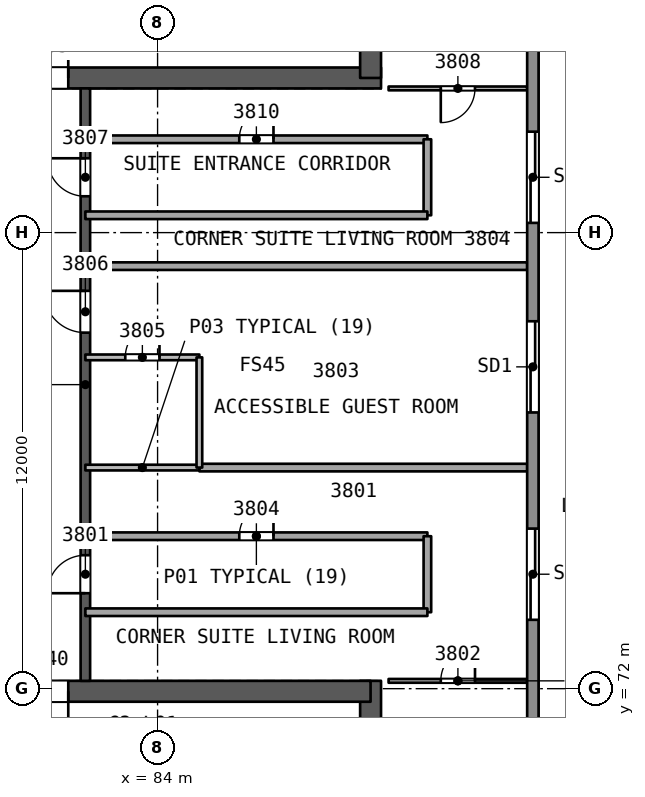
"""IFC4 building model, lengths in metres.
Left out: names, types, materials, properties, quantities, classifications, styles, units other than length and angle.
Written with IfcOpenShell. Run it as: python <this file> out.ifc"""

import sys

from ifc_helpers import new_model, si_unit, direction, frame, frame_2d, origin, place, context, subcontext, project, spatial, rectangle, extrude, element, fill, save


model = new_model("IFC4")
c1 = context("Model", 3, precision=1e-05, world=origin(), true_north=direction((0.0, 1.0)))
c2 = subcontext(c1, "Body", "Model", "MODEL_VIEW")
j1 = project(units=[si_unit("LENGTHUNIT", "METRE"), si_unit("PLANEANGLEUNIT", "RADIAN")], contexts=[c1])
p1 = place(None, origin())
s1 = spatial("IfcSite", under=j1, at=p1, CompositionType="ELEMENT")
p2 = place(p1, origin())
s2 = spatial("IfcBuilding", under=s1, at=p2, CompositionType="ELEMENT")
p3 = place(p2, frame((0.0, 0.0, 160.0)))
s3 = spatial("IfcBuildingStorey", under=s2, at=p3, CompositionType="ELEMENT", Elevation=160.0)
p4 = place(p3, frame((79.659, 88.069, 0.0), z_axis=(0.0, 0.0, 1.0), x_axis=(1.0, 0.0, 0.0)))
e1 = element("IfcWall", 1, at=p4, inside=s3, PredefinedType="SHEAR", context=c2, shape_type="SweptSolid", body=[
    extrude(rectangle(XDim=10.221, YDim=0.55, at=frame_2d((5.111, 0.0))), origin(), (0.0, 0.0, 1.0), 3.7),
])
p5 = place(p4, frame((0.791, 0.0, 0.0)))
e2 = element("IfcOpeningElement", 2, at=p5, cuts=e1, PredefinedType="OPENING", context=c2, shape_type="SweptSolid", body=[
    extrude(rectangle(XDim=1.2, YDim=2.1, at=frame_2d((0.6, 1.05))), frame((0.0, 0.286, 0.0), z_axis=(0.0, -1.0, 0.0), x_axis=(1.0, 0.0, 0.0)), (0.0, 0.0, 1.0), 0.571),
])
p6 = place(p3, frame((89.605, 88.069, 0.0), z_axis=(0.0, 0.0, 1.0), x_axis=(0.0, 1.0, 0.0)))
e3 = element("IfcWall", 3, at=p6, inside=s3, PredefinedType="SHEAR", context=c2, shape_type="SweptSolid", body=[
    extrude(rectangle(XDim=14.058, YDim=0.55, at=frame_2d((7.029, 0.0))), origin(), (0.0, 0.0, 1.0), 3.7),
])
p7 = place(p3, frame((89.605, 58.031, 0.0), z_axis=(0.0, 0.0, 1.0), x_axis=(0.0, 1.0, 0.0)))
e4 = element("IfcWall", 4, at=p7, inside=s3, PredefinedType="SHEAR", context=c2, shape_type="SweptSolid", body=[
    extrude(rectangle(XDim=14.175, YDim=0.55, at=frame_2d((7.087, 0.0))), origin(), (0.0, 0.0, 1.0), 3.7),
])
p8 = place(p3, frame((89.605, 71.931, 0.0), z_axis=(0.0, 0.0, 1.0), x_axis=(-1.0, 0.0, 0.0)))
e5 = element("IfcWall", 5, at=p8, inside=s3, PredefinedType="SHEAR", context=c2, shape_type="SweptSolid", body=[
    extrude(rectangle(XDim=10.105, YDim=0.55, at=frame_2d((5.052, 0.0))), origin(), (0.0, 0.0, 1.0), 3.7),
])
p9 = place(p8, frame((7.955, 0.0, 0.0)))
e6 = element("IfcOpeningElement", 6, at=p9, cuts=e5, PredefinedType="OPENING", context=c2, shape_type="SweptSolid", body=[
    extrude(rectangle(XDim=1.2, YDim=2.1, at=frame_2d((0.6, 1.05))), frame((0.0, 0.286, 0.0), z_axis=(0.0, -1.0, 0.0), x_axis=(1.0, 0.0, 0.0)), (0.0, 0.0, 1.0), 0.571),
])
p10 = place(p3, frame((82.1, 72.206, 0.0), z_axis=(0.0, 0.0, 1.0), x_axis=(0.0, 1.0, 0.0)))
e7 = element("IfcWall", 7, at=p10, inside=s3, PredefinedType="SHEAR", context=c2, shape_type="SweptSolid", body=[
    extrude(rectangle(XDim=15.588, YDim=0.25, at=frame_2d((7.794, 0.0))), origin(), (0.0, 0.0, 1.0), 3.25),
])
p11 = place(p10, frame((2.306, 0.0, 0.0)))
e8 = element("IfcOpeningElement", 8, at=p11, cuts=e7, PredefinedType="OPENING", context=c2, shape_type="SweptSolid", body=[
    extrude(rectangle(XDim=1.0, YDim=2.1, at=frame_2d((0.5, 1.05))), frame((0.0, 0.135, 0.0), z_axis=(0.0, -1.0, 0.0), x_axis=(1.0, 0.0, 0.0)), (0.0, 0.0, 1.0), 0.271),
])
p12 = place(p10, frame((9.162, 0.0, 0.0)))
e9 = element("IfcOpeningElement", 9, at=p12, cuts=e7, PredefinedType="OPENING", context=c2, shape_type="SweptSolid", body=[
    extrude(rectangle(XDim=1.1, YDim=2.1, at=frame_2d((0.55, 1.05))), frame((0.0, 0.135, 0.0), z_axis=(0.0, -1.0, 0.0), x_axis=(1.0, 0.0, 0.0)), (0.0, 0.0, 1.0), 0.271),
])
p13 = place(p10, frame((12.75, 0.0, 0.0)))
e10 = element("IfcOpeningElement", 10, at=p13, cuts=e7, PredefinedType="OPENING", context=c2, shape_type="SweptSolid", body=[
    extrude(rectangle(XDim=1.0, YDim=2.1, at=frame_2d((0.5, 1.05))), frame((0.0, 0.135, 0.0), z_axis=(0.0, -1.0, 0.0), x_axis=(1.0, 0.0, 0.0)), (0.0, 0.0, 1.0), 0.271),
])
p14 = place(p3, frame((90.079, 72.206, 0.0), z_axis=(0.0, 0.0, 1.0), x_axis=(1.0, 0.0, 0.0)))
e11 = element("IfcWall", 11, at=p14, inside=s3, PredefinedType="PARTITIONING", context=c2, shape_type="SweptSolid", body=[
    extrude(rectangle(XDim=3.647, YDim=0.1, at=frame_2d((1.824, 0.0))), origin(), (0.0, 0.0, 1.0), 3.25),
])
p15 = place(p14, frame((1.374, 0.0, 0.0)))
e12 = element("IfcOpeningElement", 12, at=p15, cuts=e11, PredefinedType="OPENING", context=c2, shape_type="SweptSolid", body=[
    extrude(rectangle(XDim=0.9, YDim=2.1, at=frame_2d((0.45, 1.05))), frame((0.0, 0.061, 0.0), z_axis=(0.0, -1.0, 0.0), x_axis=(1.0, 0.0, 0.0)), (0.0, 0.0, 1.0), 0.121),
])
p16 = place(p3, frame((82.1, 76.012, 0.0), z_axis=(0.0, 0.0, 1.0), x_axis=(1.0, 0.0, 0.0)))
e13 = element("IfcWall", 13, at=p16, inside=s3, PredefinedType="PARTITIONING", context=c2, shape_type="SweptSolid", body=[
    extrude(rectangle(XDim=9.0, YDim=0.2, at=frame_2d((4.5, 0.0))), origin(), (0.0, 0.0, 1.0), 3.25),
])
p17 = place(p16, frame((4.05, 0.0, 0.0)))
e14 = element("IfcOpeningElement", 14, at=p17, cuts=e13, PredefinedType="OPENING", context=c2, shape_type="SweptSolid", body=[
    extrude(rectangle(XDim=0.9, YDim=2.1, at=frame_2d((0.45, 1.05))), frame((0.0, 0.11, 0.0), z_axis=(0.0, -1.0, 0.0), x_axis=(1.0, 0.0, 0.0)), (0.0, 0.0, 1.0), 0.221),
])
p18 = place(p3, frame((91.1, 76.012, 0.0), z_axis=(0.0, 0.0, 1.0), x_axis=(0.0, -1.0, 0.0)))
e15 = element("IfcWall", 15, at=p18, inside=s3, PredefinedType="PARTITIONING", context=c2, shape_type="SweptSolid", body=[
    extrude(rectangle(XDim=2.0, YDim=0.2, at=frame_2d((1.0, 0.0))), origin(), (0.0, 0.0, 1.0), 3.25),
])
p19 = place(p3, frame((91.1, 74.012, 0.0), z_axis=(0.0, 0.0, 1.0), x_axis=(-1.0, 0.0, 0.0)))
e16 = element("IfcWall", 16, at=p19, inside=s3, PredefinedType="PARTITIONING", context=c2, shape_type="SweptSolid", body=[
    extrude(rectangle(XDim=9.0, YDim=0.2, at=frame_2d((4.5, 0.0))), origin(), (0.0, 0.0, 1.0), 3.25),
])
p20 = place(p3, frame((93.726, 77.818, 0.0), z_axis=(0.0, 0.0, 1.0), x_axis=(-1.0, 0.0, 0.0)))
e17 = element("IfcWall", 17, at=p20, inside=s3, PredefinedType="PARTITIONING", context=c2, shape_type="SweptSolid", body=[
    extrude(rectangle(XDim=8.626, YDim=0.2, at=frame_2d((4.313, 0.0))), origin(), (0.0, 0.0, 1.0), 3.25),
])
p21 = place(p3, frame((85.1, 77.818, 0.0), z_axis=(0.0, 0.0, 1.0), x_axis=(-1.0, 0.0, 0.0)))
e18 = element("IfcWall", 18, at=p21, inside=s3, PredefinedType="PARTITIONING", context=c2, shape_type="SweptSolid", body=[
    extrude(rectangle(XDim=3.0, YDim=0.15, at=frame_2d((1.5, 0.0))), origin(), (0.0, 0.0, 1.0), 3.25),
])
p22 = place(p3, frame((82.1, 80.718, 0.0), z_axis=(0.0, 0.0, 1.0), x_axis=(1.0, 0.0, 0.0)))
e19 = element("IfcWall", 19, at=p22, inside=s3, PredefinedType="PARTITIONING", context=c2, shape_type="SweptSolid", body=[
    extrude(rectangle(XDim=3.0, YDim=0.15, at=frame_2d((1.5, 0.0))), origin(), (0.0, 0.0, 1.0), 3.25),
])
p23 = place(p22, frame((1.05, 0.0, 0.0)))
e20 = element("IfcOpeningElement", 20, at=p23, cuts=e19, PredefinedType="OPENING", context=c2, shape_type="SweptSolid", body=[
    extrude(rectangle(XDim=0.9, YDim=2.1, at=frame_2d((0.45, 1.05))), frame((0.0, 0.085, 0.0), z_axis=(0.0, -1.0, 0.0), x_axis=(1.0, 0.0, 0.0)), (0.0, 0.0, 1.0), 0.171),
])
p24 = place(p3, frame((85.1, 80.718, 0.0), z_axis=(0.0, 0.0, 1.0), x_axis=(0.0, -1.0, 0.0)))
e21 = element("IfcWall", 21, at=p24, inside=s3, PredefinedType="PARTITIONING", context=c2, shape_type="SweptSolid", body=[
    extrude(rectangle(XDim=2.9, YDim=0.15, at=frame_2d((1.45, 0.0))), origin(), (0.0, 0.0, 1.0), 3.25),
])
p25 = place(p3, frame((93.726, 83.118, 0.0), z_axis=(0.0, 0.0, 1.0), x_axis=(-1.0, 0.0, 0.0)))
e22 = element("IfcWall", 22, at=p25, inside=s3, PredefinedType="PARTITIONING", context=c2, shape_type="SweptSolid", body=[
    extrude(rectangle(XDim=11.626, YDim=0.2, at=frame_2d((5.813, 0.0))), origin(), (0.0, 0.0, 1.0), 3.25),
])
p26 = place(p3, frame((93.726, 87.794, 0.0), z_axis=(0.0, 0.0, 1.0), x_axis=(-1.0, 0.0, 0.0)))
e23 = element("IfcWall", 23, at=p26, inside=s3, PredefinedType="PARTITIONING", context=c2, shape_type="SweptSolid", body=[
    extrude(rectangle(XDim=3.647, YDim=0.1, at=frame_2d((1.824, 0.0))), origin(), (0.0, 0.0, 1.0), 3.25),
])
p27 = place(p26, frame((1.374, 0.0, 0.0)))
e24 = element("IfcOpeningElement", 24, at=p27, cuts=e23, PredefinedType="OPENING", context=c2, shape_type="SweptSolid", body=[
    extrude(rectangle(XDim=0.9, YDim=2.1, at=frame_2d((0.45, 1.05))), frame((0.0, 0.061, 0.0), z_axis=(0.0, -1.0, 0.0), x_axis=(1.0, 0.0, 0.0)), (0.0, 0.0, 1.0), 0.121),
])
p28 = place(p3, frame((82.1, 86.456, 0.0), z_axis=(0.0, 0.0, 1.0), x_axis=(1.0, 0.0, 0.0)))
e25 = element("IfcWall", 25, at=p28, inside=s3, PredefinedType="PARTITIONING", context=c2, shape_type="SweptSolid", body=[
    extrude(rectangle(XDim=9.0, YDim=0.2, at=frame_2d((4.5, 0.0))), origin(), (0.0, 0.0, 1.0), 3.25),
])
p29 = place(p28, frame((4.05, 0.0, 0.0)))
e26 = element("IfcOpeningElement", 26, at=p29, cuts=e25, PredefinedType="OPENING", context=c2, shape_type="SweptSolid", body=[
    extrude(rectangle(XDim=0.9, YDim=2.1, at=frame_2d((0.45, 1.05))), frame((0.0, 0.11, 0.0), z_axis=(0.0, -1.0, 0.0), x_axis=(1.0, 0.0, 0.0)), (0.0, 0.0, 1.0), 0.221),
])
p30 = place(p3, frame((91.1, 86.456, 0.0), z_axis=(0.0, 0.0, 1.0), x_axis=(0.0, -1.0, 0.0)))
e27 = element("IfcWall", 27, at=p30, inside=s3, PredefinedType="PARTITIONING", context=c2, shape_type="SweptSolid", body=[
    extrude(rectangle(XDim=2.0, YDim=0.2, at=frame_2d((1.0, 0.0))), origin(), (0.0, 0.0, 1.0), 3.25),
])
p31 = place(p3, frame((91.1, 84.456, 0.0), z_axis=(0.0, 0.0, 1.0), x_axis=(-1.0, 0.0, 0.0)))
e28 = element("IfcWall", 28, at=p31, inside=s3, PredefinedType="PARTITIONING", context=c2, shape_type="SweptSolid", body=[
    extrude(rectangle(XDim=9.0, YDim=0.2, at=frame_2d((4.5, 0.0))), origin(), (0.0, 0.0, 1.0), 3.25),
])
p32 = place(p3, frame((93.875, 107.14, 0.0), z_axis=(0.0, 0.0, 1.0), x_axis=(0.0, -1.0, 0.0)))
e29 = element("IfcWall", 29, at=p32, inside=s3, PredefinedType="SOLIDWALL", context=c2, shape_type="SweptSolid", body=[
    extrude(rectangle(XDim=54.279, YDim=0.3, at=frame_2d((27.14, 0.0))), origin(), (0.0, 0.0, 1.0), 3.25),
])
p33 = place(p32, frame((25.472, 0.0, 0.0)))
e30 = element("IfcOpeningElement", 30, at=p33, cuts=e29, PredefinedType="OPENING", context=c2, shape_type="SweptSolid", body=[
    extrude(rectangle(XDim=2.4, YDim=2.4, at=frame_2d((1.2, 1.2))), frame((0.0, 0.161, 0.0), z_axis=(0.0, -1.0, 0.0), x_axis=(1.0, 0.0, 0.0)), (0.0, 0.0, 1.0), 0.321),
])
p34 = place(p32, frame((30.928, 0.0, 0.0)))
e31 = element("IfcOpeningElement", 31, at=p34, cuts=e29, PredefinedType="OPENING", context=c2, shape_type="SweptSolid", body=[
    extrude(rectangle(XDim=2.4, YDim=2.4, at=frame_2d((1.2, 1.2))), frame((0.0, 0.161, 0.0), z_axis=(0.0, -1.0, 0.0), x_axis=(1.0, 0.0, 0.0)), (0.0, 0.0, 1.0), 0.321),
])
p35 = place(p32, frame((42.175, 0.0, 0.0)))
e32 = element("IfcOpeningElement", 32, at=p35, cuts=e29, PredefinedType="OPENING", context=c2, shape_type="SweptSolid", body=[
    extrude(rectangle(XDim=2.4, YDim=2.4, at=frame_2d((1.2, 1.2))), frame((0.0, 0.161, 0.0), z_axis=(0.0, -1.0, 0.0), x_axis=(1.0, 0.0, 0.0)), (0.0, 0.0, 1.0), 0.321),
])
p36 = place(p32, frame((20.484, 0.0, 0.0)))
e33 = element("IfcOpeningElement", 33, at=p36, cuts=e29, PredefinedType="OPENING", context=c2, shape_type="SweptSolid", body=[
    extrude(rectangle(XDim=2.4, YDim=2.4, at=frame_2d((1.2, 1.2))), frame((0.0, 0.161, 0.0), z_axis=(0.0, -1.0, 0.0), x_axis=(1.0, 0.0, 0.0)), (0.0, 0.0, 1.0), 0.321),
])
p37 = place(p32, frame((9.737, 0.0, 0.0)))
e34 = element("IfcOpeningElement", 34, at=p37, cuts=e29, PredefinedType="OPENING", context=c2, shape_type="SweptSolid", body=[
    extrude(rectangle(XDim=2.4, YDim=2.4, at=frame_2d((1.2, 1.2))), frame((0.0, 0.161, 0.0), z_axis=(0.0, -1.0, 0.0), x_axis=(1.0, 0.0, 0.0)), (0.0, 0.0, 1.0), 0.321),
])
p38 = place(p3, frame((42.059, 82.777, 0.0), z_axis=(0.0, 0.0, 1.0), x_axis=(0.866025745652, 0.499999407868, 0.0)))
e35 = element("IfcWall", 35, at=p38, inside=s3, PredefinedType="SOLIDWALL", context=c2, shape_type="SweptSolid", body=[
    extrude(rectangle(XDim=54.279, YDim=0.3, at=frame_2d((27.14, 0.0))), origin(), (0.0, 0.0, 1.0), 3.25),
])
p39 = place(p38, frame((26.719, 0.0, 0.0)))
e36 = element("IfcOpeningElement", 36, at=p39, cuts=e35, PredefinedType="OPENING", context=c2, shape_type="SweptSolid", body=[
    extrude(rectangle(XDim=2.4, YDim=2.4, at=frame_2d((1.2, 1.2))), frame((0.0, 0.161, 0.0), z_axis=(0.0, -1.0, 0.0), x_axis=(1.0, 0.0, 0.0)), (0.0, 0.0, 1.0), 0.321),
])
p40 = place(p38, frame((31.708, 0.0, 0.0)))
e37 = element("IfcOpeningElement", 37, at=p40, cuts=e35, PredefinedType="OPENING", context=c2, shape_type="SweptSolid", body=[
    extrude(rectangle(XDim=2.4, YDim=2.4, at=frame_2d((1.2, 1.2))), frame((0.0, 0.161, 0.0), z_axis=(0.0, -1.0, 0.0), x_axis=(1.0, 0.0, 0.0)), (0.0, 0.0, 1.0), 0.321),
])
p41 = place(p38, frame((42.175, 0.0, 0.0)))
e38 = element("IfcOpeningElement", 38, at=p41, cuts=e35, PredefinedType="OPENING", context=c2, shape_type="SweptSolid", body=[
    extrude(rectangle(XDim=2.4, YDim=2.4, at=frame_2d((1.2, 1.2))), frame((0.0, 0.161, 0.0), z_axis=(0.0, -1.0, 0.0), x_axis=(1.0, 0.0, 0.0)), (0.0, 0.0, 1.0), 0.321),
])
p42 = place(p38, frame((11.235, 0.0, 0.0)))
e39 = element("IfcOpeningElement", 39, at=p42, cuts=e35, PredefinedType="OPENING", context=c2, shape_type="SweptSolid", body=[
    extrude(rectangle(XDim=2.4, YDim=2.4, at=frame_2d((1.2, 1.2))), frame((0.0, 0.161, 0.0), z_axis=(0.0, -1.0, 0.0), x_axis=(1.0, 0.0, 0.0)), (0.0, 0.0, 1.0), 0.321),
])
p43 = place(p3, frame((89.066, 50.083, 0.0), z_axis=(0.0, 0.0, 1.0), x_axis=(-0.866025745652, 0.499999407868, 0.0)))
e40 = element("IfcWall", 40, at=p43, inside=s3, PredefinedType="SOLIDWALL", context=c2, shape_type="SweptSolid", body=[
    extrude(rectangle(XDim=54.279, YDim=0.3, at=frame_2d((27.14, 0.0))), origin(), (0.0, 0.0, 1.0), 3.25),
])
p44 = place(p43, frame((41.112, 0.0, 0.0)))
e41 = element("IfcOpeningElement", 41, at=p44, cuts=e40, PredefinedType="OPENING", context=c2, shape_type="SweptSolid", body=[
    extrude(rectangle(XDim=2.4, YDim=2.4, at=frame_2d((1.2, 1.2))), frame((0.0, 0.161, 0.0), z_axis=(0.0, -1.0, 0.0), x_axis=(1.0, 0.0, 0.0)), (0.0, 0.0, 1.0), 0.321),
])
p45 = place(p43, frame((11.235, 0.0, 0.0)))
e42 = element("IfcOpeningElement", 42, at=p45, cuts=e40, PredefinedType="OPENING", context=c2, shape_type="SweptSolid", body=[
    extrude(rectangle(XDim=2.4, YDim=2.4, at=frame_2d((1.2, 1.2))), frame((0.0, 0.161, 0.0), z_axis=(0.0, -1.0, 0.0), x_axis=(1.0, 0.0, 0.0)), (0.0, 0.0, 1.0), 0.321),
])
p46 = place(p43, frame((28.032, 0.0, 0.9)))
e43 = element("IfcOpeningElement", 43, at=p46, cuts=e40, PredefinedType="OPENING", context=c2, shape_type="SweptSolid", body=[
    extrude(rectangle(XDim=1.8, YDim=1.5, at=frame_2d((0.9, 0.75))), frame((0.0, 0.161, 0.0), z_axis=(0.0, -1.0, 0.0), x_axis=(1.0, 0.0, 0.0)), (0.0, 0.0, 1.0), 0.321),
])
p47 = place(p43, frame((25.382, 0.0, 0.9)))
e44 = element("IfcOpeningElement", 44, at=p47, cuts=e40, PredefinedType="OPENING", context=c2, shape_type="SweptSolid", body=[
    extrude(rectangle(XDim=1.8, YDim=1.5, at=frame_2d((0.9, 0.75))), frame((0.0, 0.161, 0.0), z_axis=(0.0, -1.0, 0.0), x_axis=(1.0, 0.0, 0.0)), (0.0, 0.0, 1.0), 0.321),
])
p48 = place(p11, origin())
e45 = element("IfcDoor", 45, at=p48, inside=s3, OperationType="SINGLE_SWING_LEFT", PredefinedType="NOTDEFINED", context=c2, shape_type="SweptSolid", body=[
    extrude(rectangle(XDim=1.0, YDim=2.1, at=frame_2d((0.5, 1.05))), frame((0.0, 0.025, 0.0), z_axis=(0.0, -1.0, 0.0), x_axis=(1.0, 0.0, 0.0)), (0.0, 0.0, 1.0), 0.05),
])
fill(e8, e45)
p49 = place(p15, origin())
e46 = element("IfcDoor", 46, at=p49, inside=s3, OperationType="SINGLE_SWING_RIGHT", PredefinedType="NOTDEFINED", context=c2, shape_type="SweptSolid", body=[
    extrude(rectangle(XDim=0.9, YDim=2.1, at=frame_2d((0.45, 1.05))), frame((0.0, 0.025, 0.0), z_axis=(0.0, -1.0, 0.0), x_axis=(1.0, 0.0, 0.0)), (0.0, 0.0, 1.0), 0.05),
])
fill(e12, e46)
p50 = place(p17, origin())
e47 = element("IfcDoor", 47, at=p50, inside=s3, OperationType="SINGLE_SWING_RIGHT", PredefinedType="NOTDEFINED", context=c2, shape_type="SweptSolid", body=[
    extrude(rectangle(XDim=0.9, YDim=2.1, at=frame_2d((0.45, 1.05))), frame((0.0, 0.025, 0.0), z_axis=(0.0, -1.0, 0.0), x_axis=(1.0, 0.0, 0.0)), (0.0, 0.0, 1.0), 0.05),
])
fill(e14, e47)
p51 = place(p23, origin())
e48 = element("IfcDoor", 48, at=p51, inside=s3, OperationType="SINGLE_SWING_RIGHT", PredefinedType="NOTDEFINED", context=c2, shape_type="SweptSolid", body=[
    extrude(rectangle(XDim=0.9, YDim=2.1, at=frame_2d((0.45, 1.05))), frame((0.0, 0.025, 0.0), z_axis=(0.0, -1.0, 0.0), x_axis=(1.0, 0.0, 0.0)), (0.0, 0.0, 1.0), 0.05),
])
fill(e20, e48)
p52 = place(p12, origin())
e49 = element("IfcDoor", 49, at=p52, inside=s3, OperationType="SINGLE_SWING_RIGHT", PredefinedType="NOTDEFINED", context=c2, shape_type="SweptSolid", body=[
    extrude(rectangle(XDim=1.1, YDim=2.1, at=frame_2d((0.55, 1.05))), frame((0.0, 0.025, 0.0), z_axis=(0.0, -1.0, 0.0), x_axis=(1.0, 0.0, 0.0)), (0.0, 0.0, 1.0), 0.05),
])
fill(e9, e49)
p53 = place(p13, origin())
e50 = element("IfcDoor", 50, at=p53, inside=s3, OperationType="SINGLE_SWING_RIGHT", PredefinedType="NOTDEFINED", context=c2, shape_type="SweptSolid", body=[
    extrude(rectangle(XDim=1.0, YDim=2.1, at=frame_2d((0.5, 1.05))), frame((0.0, 0.025, 0.0), z_axis=(0.0, -1.0, 0.0), x_axis=(1.0, 0.0, 0.0)), (0.0, 0.0, 1.0), 0.05),
])
fill(e10, e50)
p54 = place(p27, origin())
e51 = element("IfcDoor", 51, at=p54, inside=s3, OperationType="SINGLE_SWING_RIGHT", PredefinedType="NOTDEFINED", context=c2, shape_type="SweptSolid", body=[
    extrude(rectangle(XDim=0.9, YDim=2.1, at=frame_2d((0.45, 1.05))), frame((0.0, 0.025, 0.0), z_axis=(0.0, -1.0, 0.0), x_axis=(1.0, 0.0, 0.0)), (0.0, 0.0, 1.0), 0.05),
])
fill(e24, e51)
p55 = place(p29, origin())
e52 = element("IfcDoor", 52, at=p55, inside=s3, OperationType="SINGLE_SWING_RIGHT", PredefinedType="NOTDEFINED", context=c2, shape_type="SweptSolid", body=[
    extrude(rectangle(XDim=0.9, YDim=2.1, at=frame_2d((0.45, 1.05))), frame((0.0, 0.025, 0.0), z_axis=(0.0, -1.0, 0.0), x_axis=(1.0, 0.0, 0.0)), (0.0, 0.0, 1.0), 0.05),
])
fill(e26, e52)
p56 = place(p33, origin())
e53 = element("IfcDoor", 53, at=p56, inside=s3, OperationType="SLIDING_TO_LEFT", PredefinedType="NOTDEFINED", context=c2, shape_type="SweptSolid", body=[
    extrude(rectangle(XDim=2.4, YDim=2.4, at=frame_2d((1.2, 1.2))), frame((0.0, 0.025, 0.0), z_axis=(0.0, -1.0, 0.0), x_axis=(1.0, 0.0, 0.0)), (0.0, 0.0, 1.0), 0.05),
])
fill(e30, e53)
p57 = place(p34, origin())
e54 = element("IfcDoor", 54, at=p57, inside=s3, OperationType="SLIDING_TO_RIGHT", PredefinedType="NOTDEFINED", context=c2, shape_type="SweptSolid", body=[
    extrude(rectangle(XDim=2.4, YDim=2.4, at=frame_2d((1.2, 1.2))), frame((0.0, 0.025, 0.0), z_axis=(0.0, -1.0, 0.0), x_axis=(1.0, 0.0, 0.0)), (0.0, 0.0, 1.0), 0.05),
])
fill(e31, e54)
p58 = place(p36, origin())
e55 = element("IfcDoor", 55, at=p58, inside=s3, OperationType="SLIDING_TO_RIGHT", PredefinedType="NOTDEFINED", context=c2, shape_type="SweptSolid", body=[
    extrude(rectangle(XDim=2.4, YDim=2.4, at=frame_2d((1.2, 1.2))), frame((0.0, 0.025, 0.0), z_axis=(0.0, -1.0, 0.0), x_axis=(1.0, 0.0, 0.0)), (0.0, 0.0, 1.0), 0.05),
])
fill(e33, e55)
p59 = place(p5, origin())
e56 = element("IfcDoor", 56, at=p59, inside=s3, OperationType="SINGLE_SWING_RIGHT", PredefinedType="NOTDEFINED", context=c2, shape_type="SweptSolid", body=[
    extrude(rectangle(XDim=1.2, YDim=2.1, at=frame_2d((0.6, 1.05))), frame((0.0, 0.025, 0.0), z_axis=(0.0, -1.0, 0.0), x_axis=(1.0, 0.0, 0.0)), (0.0, 0.0, 1.0), 0.05),
])
fill(e2, e56)
p60 = place(p9, origin())
e57 = element("IfcDoor", 57, at=p60, inside=s3, OperationType="SINGLE_SWING_LEFT", PredefinedType="NOTDEFINED", context=c2, shape_type="SweptSolid", body=[
    extrude(rectangle(XDim=1.2, YDim=2.1, at=frame_2d((0.6, 1.05))), frame((0.0, 0.025, 0.0), z_axis=(0.0, -1.0, 0.0), x_axis=(1.0, 0.0, 0.0)), (0.0, 0.0, 1.0), 0.05),
])
fill(e6, e57)
save(model, sys.argv[1])
